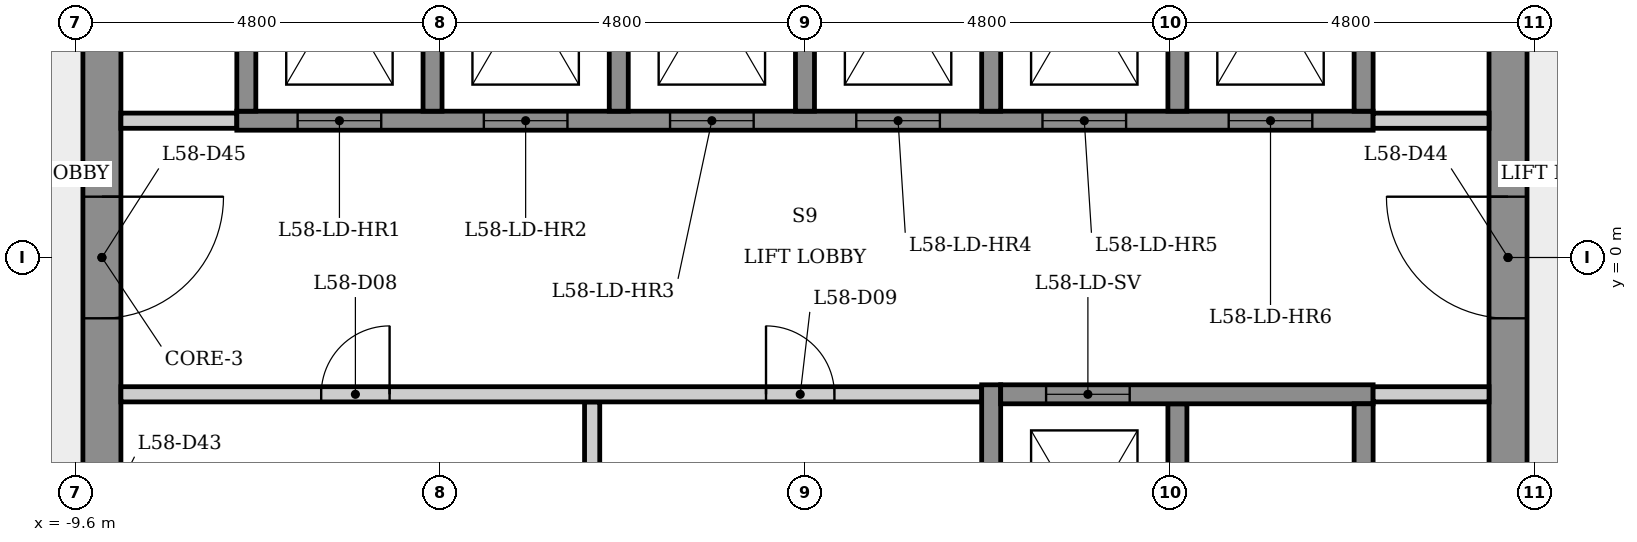
"""IFC4 building model, lengths in metres.
Left out: names, types, materials, properties, quantities, classifications, styles, units other than length and angle.
Written with IfcOpenShell. Run it as: python <this file> out.ifc"""

import sys

from ifc_helpers import new_model, si_unit, direction, frame, frame_2d, origin, place, context, subcontext, project, spatial, rectangle, extrude, element, fill, save


model = new_model("IFC4")
c1 = context("Model", 3, precision=1e-05, world=origin(), true_north=direction((0.0, 1.0)))
c2 = subcontext(c1, "Body", "Model", "MODEL_VIEW")
j1 = project(units=[si_unit("LENGTHUNIT", "METRE"), si_unit("PLANEANGLEUNIT", "RADIAN")], contexts=[c1])
p1 = place(None, origin())
s1 = spatial("IfcSite", under=j1, at=p1, CompositionType="ELEMENT")
p2 = place(p1, origin())
s2 = spatial("IfcBuilding", under=s1, at=p2, CompositionType="ELEMENT")
p3 = place(p2, frame((0.0, 0.0, 218.9)))
s3 = spatial("IfcBuildingStorey", under=s2, at=p3, CompositionType="ELEMENT", Elevation=218.9)
p4 = place(p3, frame((9.25, -5.485, 0.0), z_axis=(0.0, 0.0, 1.0), x_axis=(0.0, 1.0, 0.0)))
e1 = element("IfcWall", 1, at=p4, inside=s3, PredefinedType="SHEAR", context=c2, shape_type="SweptSolid", body=[
    extrude(rectangle(XDim=10.97, YDim=0.5, at=frame_2d((5.485, 0.0))), origin(), (0.0, 0.0, 1.0), 3.4),
])
p5 = place(p4, frame((4.685, 0.0, 0.0)))
e2 = element("IfcOpeningElement", 2, at=p5, cuts=e1, PredefinedType="OPENING", context=c2, shape_type="SweptSolid", body=[
    extrude(rectangle(XDim=1.6, YDim=2.1, at=frame_2d((0.8, 1.05))), frame((0.0, 0.26, 0.0), z_axis=(0.0, -1.0, 0.0), x_axis=(1.0, 0.0, 0.0)), (0.0, 0.0, 1.0), 0.52),
])
p6 = place(p3, frame((-9.25, 5.485, 0.0), z_axis=(0.0, 0.0, 1.0), x_axis=(0.0, -1.0, 0.0)))
e3 = element("IfcWall", 3, at=p6, inside=s3, PredefinedType="SHEAR", context=c2, shape_type="SweptSolid", body=[
    extrude(rectangle(XDim=10.97, YDim=0.5, at=frame_2d((5.485, 0.0))), origin(), (0.0, 0.0, 1.0), 3.4),
])
p7 = place(p6, frame((8.51, 0.0, 0.0)))
e4 = element("IfcOpeningElement", 4, at=p7, cuts=e3, PredefinedType="OPENING", context=c2, shape_type="SweptSolid", body=[
    extrude(rectangle(XDim=0.9, YDim=2.1, at=frame_2d((0.45, 1.05))), frame((0.0, 0.26, 0.0), z_axis=(0.0, -1.0, 0.0), x_axis=(1.0, 0.0, 0.0)), (0.0, 0.0, 1.0), 0.52),
])
p8 = place(p6, frame((4.685, 0.0, 0.0)))
e5 = element("IfcOpeningElement", 5, at=p8, cuts=e3, PredefinedType="OPENING", context=c2, shape_type="SweptSolid", body=[
    extrude(rectangle(XDim=1.6, YDim=2.1, at=frame_2d((0.8, 1.05))), frame((0.0, 0.26, 0.0), z_axis=(0.0, -1.0, 0.0), x_axis=(1.0, 0.0, 0.0)), (0.0, 0.0, 1.0), 0.52),
])
p9 = place(p3, frame((-9.0, 1.8, 0.0), z_axis=(0.0, 0.0, 1.0), x_axis=(1.0, 0.0, 0.0)))
e6 = element("IfcWall", 6, at=p9, inside=s3, PredefinedType="PARTITIONING", context=c2, shape_type="SweptSolid", body=[
    extrude(rectangle(XDim=1.525, YDim=0.2, at=frame_2d((0.763, 0.0))), origin(), (0.0, 0.0, 1.0), 3.05),
])
p10 = place(p3, frame((-7.475, 1.8, 0.0), z_axis=(0.0, 0.0, 1.0), x_axis=(1.0, 0.0, 0.0)))
e7 = element("IfcWall", 7, at=p10, inside=s3, PredefinedType="SHEAR", context=c2, shape_type="SweptSolid", body=[
    extrude(rectangle(XDim=14.95, YDim=0.25, at=frame_2d((7.475, 0.0))), origin(), (0.0, 0.0, 1.0), 3.05),
])
p11 = place(p10, frame((0.8, 0.0, 0.0)))
e8 = element("IfcOpeningElement", 8, at=p11, cuts=e7, PredefinedType="OPENING", context=c2, shape_type="SweptSolid", body=[
    extrude(rectangle(XDim=1.1, YDim=2.1, at=frame_2d((0.55, 1.05))), frame((0.0, 0.135, 0.0), z_axis=(0.0, -1.0, 0.0), x_axis=(1.0, 0.0, 0.0)), (0.0, 0.0, 1.0), 0.27),
])
p12 = place(p10, frame((3.25, 0.0, 0.0)))
e9 = element("IfcOpeningElement", 9, at=p12, cuts=e7, PredefinedType="OPENING", context=c2, shape_type="SweptSolid", body=[
    extrude(rectangle(XDim=1.1, YDim=2.1, at=frame_2d((0.55, 1.05))), frame((0.0, 0.135, 0.0), z_axis=(0.0, -1.0, 0.0), x_axis=(1.0, 0.0, 0.0)), (0.0, 0.0, 1.0), 0.27),
])
p13 = place(p10, frame((5.7, 0.0, 0.0)))
e10 = element("IfcOpeningElement", 10, at=p13, cuts=e7, PredefinedType="OPENING", context=c2, shape_type="SweptSolid", body=[
    extrude(rectangle(XDim=1.1, YDim=2.1, at=frame_2d((0.55, 1.05))), frame((0.0, 0.135, 0.0), z_axis=(0.0, -1.0, 0.0), x_axis=(1.0, 0.0, 0.0)), (0.0, 0.0, 1.0), 0.27),
])
p14 = place(p10, frame((8.15, 0.0, 0.0)))
e11 = element("IfcOpeningElement", 11, at=p14, cuts=e7, PredefinedType="OPENING", context=c2, shape_type="SweptSolid", body=[
    extrude(rectangle(XDim=1.1, YDim=2.1, at=frame_2d((0.55, 1.05))), frame((0.0, 0.135, 0.0), z_axis=(0.0, -1.0, 0.0), x_axis=(1.0, 0.0, 0.0)), (0.0, 0.0, 1.0), 0.27),
])
p15 = place(p10, frame((10.6, 0.0, 0.0)))
e12 = element("IfcOpeningElement", 12, at=p15, cuts=e7, PredefinedType="OPENING", context=c2, shape_type="SweptSolid", body=[
    extrude(rectangle(XDim=1.1, YDim=2.1, at=frame_2d((0.55, 1.05))), frame((0.0, 0.135, 0.0), z_axis=(0.0, -1.0, 0.0), x_axis=(1.0, 0.0, 0.0)), (0.0, 0.0, 1.0), 0.27),
])
p16 = place(p10, frame((13.05, 0.0, 0.0)))
e13 = element("IfcOpeningElement", 13, at=p16, cuts=e7, PredefinedType="OPENING", context=c2, shape_type="SweptSolid", body=[
    extrude(rectangle(XDim=1.1, YDim=2.1, at=frame_2d((0.55, 1.05))), frame((0.0, 0.135, 0.0), z_axis=(0.0, -1.0, 0.0), x_axis=(1.0, 0.0, 0.0)), (0.0, 0.0, 1.0), 0.27),
])
p17 = place(p3, frame((-7.35, 1.925, 0.0), z_axis=(0.0, 0.0, 1.0), x_axis=(0.0, 1.0, 0.0)))
e14 = element("IfcWall", 14, at=p17, inside=s3, PredefinedType="SHEAR", context=c2, shape_type="SweptSolid", body=[
    extrude(rectangle(XDim=3.35, YDim=0.25, at=frame_2d((1.675, 0.0))), origin(), (0.0, 0.0, 1.0), 3.05),
])
p18 = place(p3, frame((-4.9, 5.025, 0.0), z_axis=(0.0, 0.0, 1.0), x_axis=(0.0, -1.0, 0.0)))
e15 = element("IfcWall", 15, at=p18, inside=s3, PredefinedType="SHEAR", context=c2, shape_type="SweptSolid", body=[
    extrude(rectangle(XDim=3.1, YDim=0.25, at=frame_2d((1.55, 0.0))), origin(), (0.0, 0.0, 1.0), 3.4),
])
p19 = place(p3, frame((-2.8, -1.9, 0.0), z_axis=(0.0, 0.0, 1.0), x_axis=(0.0, -1.0, 0.0)))
e16 = element("IfcWall", 16, at=p19, inside=s3, PredefinedType="PARTITIONING", context=c2, shape_type="SweptSolid", body=[
    extrude(rectangle(XDim=3.15, YDim=0.2, at=frame_2d((1.575, 0.0))), origin(), (0.0, 0.0, 1.0), 3.05),
])
p20 = place(p3, frame((-9.0, -1.8, 0.0), z_axis=(0.0, 0.0, 1.0), x_axis=(1.0, 0.0, 0.0)))
e17 = element("IfcWall", 17, at=p20, inside=s3, PredefinedType="PARTITIONING", context=c2, shape_type="SweptSolid", body=[
    extrude(rectangle(XDim=11.325, YDim=0.2, at=frame_2d((5.663, 0.0))), origin(), (0.0, 0.0, 1.0), 3.05),
])
p21 = place(p20, frame((2.635, 0.0, 0.0)))
e18 = element("IfcOpeningElement", 18, at=p21, cuts=e17, PredefinedType="OPENING", context=c2, shape_type="SweptSolid", body=[
    extrude(rectangle(XDim=0.9, YDim=2.1, at=frame_2d((0.45, 1.05))), frame((0.0, 0.11, 0.0), z_axis=(0.0, -1.0, 0.0), x_axis=(1.0, 0.0, 0.0)), (0.0, 0.0, 1.0), 0.22),
])
p22 = place(p20, frame((8.488, 0.0, 0.0)))
e19 = element("IfcOpeningElement", 19, at=p22, cuts=e17, PredefinedType="OPENING", context=c2, shape_type="SweptSolid", body=[
    extrude(rectangle(XDim=0.9, YDim=2.1, at=frame_2d((0.45, 1.05))), frame((0.0, 0.11, 0.0), z_axis=(0.0, -1.0, 0.0), x_axis=(1.0, 0.0, 0.0)), (0.0, 0.0, 1.0), 0.22),
])
for number, where, z_axis, x_axis in (
    (20, (-2.45, 5.025, 0.0), (0.0, 0.0, 1.0), (0.0, -1.0, 0.0)),
    (21, (0.0, 5.025, 0.0), (0.0, 0.0, 1.0), (0.0, -1.0, 0.0)),
):
    element("IfcWall", number, at=place(p3, frame(where, z_axis=z_axis, x_axis=x_axis)), inside=s3, PredefinedType="SHEAR", context=c2, shape_type="SweptSolid", body=[
        extrude(rectangle(XDim=3.1, YDim=0.25, at=frame_2d((1.55, 0.0))), origin(), (0.0, 0.0, 1.0), 3.4),
    ])
p23 = place(p3, frame((2.45, -5.275, 0.0), z_axis=(0.0, 0.0, 1.0), x_axis=(0.0, 1.0, 0.0)))
e22 = element("IfcWall", 22, at=p23, inside=s3, PredefinedType="SHEAR", context=c2, shape_type="SweptSolid", body=[
    extrude(rectangle(XDim=3.6, YDim=0.25, at=frame_2d((1.8, 0.0))), origin(), (0.0, 0.0, 1.0), 3.05),
])
for number, where, z_axis, x_axis in (
    (23, (2.45, 5.025, 0.0), (0.0, 0.0, 1.0), (0.0, -1.0, 0.0)),
    (24, (4.9, -1.925, 0.0), (0.0, 0.0, 1.0), (0.0, -1.0, 0.0)),
    (25, (4.9, 5.025, 0.0), (0.0, 0.0, 1.0), (0.0, -1.0, 0.0)),
):
    element("IfcWall", number, at=place(p3, frame(where, z_axis=z_axis, x_axis=x_axis)), inside=s3, PredefinedType="SHEAR", context=c2, shape_type="SweptSolid", body=[
        extrude(rectangle(XDim=3.1, YDim=0.25, at=frame_2d((1.55, 0.0))), origin(), (0.0, 0.0, 1.0), 3.4),
    ])
p24 = place(p3, frame((2.575, -1.8, 0.0), z_axis=(0.0, 0.0, 1.0), x_axis=(1.0, 0.0, 0.0)))
e26 = element("IfcWall", 26, at=p24, inside=s3, PredefinedType="SHEAR", context=c2, shape_type="SweptSolid", body=[
    extrude(rectangle(XDim=4.9, YDim=0.25, at=frame_2d((2.45, 0.0))), origin(), (0.0, 0.0, 1.0), 3.05),
])
p25 = place(p24, frame((0.597, 0.0, 0.0)))
e27 = element("IfcOpeningElement", 27, at=p25, cuts=e26, PredefinedType="OPENING", context=c2, shape_type="SweptSolid", body=[
    extrude(rectangle(XDim=1.1, YDim=2.1, at=frame_2d((0.55, 1.05))), frame((0.0, 0.135, 0.0), z_axis=(0.0, -1.0, 0.0), x_axis=(1.0, 0.0, 0.0)), (0.0, 0.0, 1.0), 0.27),
])
p26 = place(p3, frame((7.475, 1.8, 0.0), z_axis=(0.0, 0.0, 1.0), x_axis=(1.0, 0.0, 0.0)))
e28 = element("IfcWall", 28, at=p26, inside=s3, PredefinedType="PARTITIONING", context=c2, shape_type="SweptSolid", body=[
    extrude(rectangle(XDim=1.525, YDim=0.2, at=frame_2d((0.763, 0.0))), origin(), (0.0, 0.0, 1.0), 3.05),
])
for number, where, z_axis, x_axis in (
    (29, (7.35, -1.925, 0.0), (0.0, 0.0, 1.0), (0.0, -1.0, 0.0)),
    (30, (7.35, 5.025, 0.0), (0.0, 0.0, 1.0), (0.0, -1.0, 0.0)),
):
    element("IfcWall", number, at=place(p3, frame(where, z_axis=z_axis, x_axis=x_axis)), inside=s3, PredefinedType="SHEAR", context=c2, shape_type="SweptSolid", body=[
        extrude(rectangle(XDim=3.1, YDim=0.25, at=frame_2d((1.55, 0.0))), origin(), (0.0, 0.0, 1.0), 3.4),
    ])
p27 = place(p3, frame((9.0, -1.8, 0.0), z_axis=(0.0, 0.0, 1.0), x_axis=(-1.0, 0.0, 0.0)))
e31 = element("IfcWall", 31, at=p27, inside=s3, PredefinedType="PARTITIONING", context=c2, shape_type="SweptSolid", body=[
    extrude(rectangle(XDim=1.525, YDim=0.2, at=frame_2d((0.763, 0.0))), origin(), (0.0, 0.0, 1.0), 3.05),
])
p28 = place(p11, origin())
e32 = element("IfcDoor", 32, at=p28, inside=s3, OperationType="SLIDING_TO_LEFT", PredefinedType="DOOR", context=c2, shape_type="SweptSolid", body=[
    extrude(rectangle(XDim=1.1, YDim=2.1, at=frame_2d((0.55, 1.05))), frame((0.0, 0.025, 0.0), z_axis=(0.0, -1.0, 0.0), x_axis=(1.0, 0.0, 0.0)), (0.0, 0.0, 1.0), 0.05),
])
fill(e8, e32)
p29 = place(p12, origin())
e33 = element("IfcDoor", 33, at=p29, inside=s3, OperationType="SLIDING_TO_LEFT", PredefinedType="DOOR", context=c2, shape_type="SweptSolid", body=[
    extrude(rectangle(XDim=1.1, YDim=2.1, at=frame_2d((0.55, 1.05))), frame((0.0, 0.025, 0.0), z_axis=(0.0, -1.0, 0.0), x_axis=(1.0, 0.0, 0.0)), (0.0, 0.0, 1.0), 0.05),
])
fill(e9, e33)
p30 = place(p13, origin())
e34 = element("IfcDoor", 34, at=p30, inside=s3, OperationType="SLIDING_TO_LEFT", PredefinedType="DOOR", context=c2, shape_type="SweptSolid", body=[
    extrude(rectangle(XDim=1.1, YDim=2.1, at=frame_2d((0.55, 1.05))), frame((0.0, 0.025, 0.0), z_axis=(0.0, -1.0, 0.0), x_axis=(1.0, 0.0, 0.0)), (0.0, 0.0, 1.0), 0.05),
])
fill(e10, e34)
p31 = place(p14, origin())
e35 = element("IfcDoor", 35, at=p31, inside=s3, OperationType="SLIDING_TO_LEFT", PredefinedType="DOOR", context=c2, shape_type="SweptSolid", body=[
    extrude(rectangle(XDim=1.1, YDim=2.1, at=frame_2d((0.55, 1.05))), frame((0.0, 0.025, 0.0), z_axis=(0.0, -1.0, 0.0), x_axis=(1.0, 0.0, 0.0)), (0.0, 0.0, 1.0), 0.05),
])
fill(e11, e35)
p32 = place(p15, origin())
e36 = element("IfcDoor", 36, at=p32, inside=s3, OperationType="SLIDING_TO_LEFT", PredefinedType="DOOR", context=c2, shape_type="SweptSolid", body=[
    extrude(rectangle(XDim=1.1, YDim=2.1, at=frame_2d((0.55, 1.05))), frame((0.0, 0.025, 0.0), z_axis=(0.0, -1.0, 0.0), x_axis=(1.0, 0.0, 0.0)), (0.0, 0.0, 1.0), 0.05),
])
fill(e12, e36)
p33 = place(p16, origin())
e37 = element("IfcDoor", 37, at=p33, inside=s3, OperationType="SLIDING_TO_LEFT", PredefinedType="DOOR", context=c2, shape_type="SweptSolid", body=[
    extrude(rectangle(XDim=1.1, YDim=2.1, at=frame_2d((0.55, 1.05))), frame((0.0, 0.025, 0.0), z_axis=(0.0, -1.0, 0.0), x_axis=(1.0, 0.0, 0.0)), (0.0, 0.0, 1.0), 0.05),
])
fill(e13, e37)
p34 = place(p25, origin())
e38 = element("IfcDoor", 38, at=p34, inside=s3, OperationType="SLIDING_TO_LEFT", PredefinedType="DOOR", context=c2, shape_type="SweptSolid", body=[
    extrude(rectangle(XDim=1.1, YDim=2.1, at=frame_2d((0.55, 1.05))), frame((0.0, 0.025, 0.0), z_axis=(0.0, -1.0, 0.0), x_axis=(1.0, 0.0, 0.0)), (0.0, 0.0, 1.0), 0.05),
])
fill(e27, e38)
p35 = place(p21, origin())
e39 = element("IfcDoor", 39, at=p35, inside=s3, OperationType="SINGLE_SWING_RIGHT", PredefinedType="DOOR", context=c2, shape_type="SweptSolid", body=[
    extrude(rectangle(XDim=0.9, YDim=2.1, at=frame_2d((0.45, 1.05))), frame((0.0, 0.025, 0.0), z_axis=(0.0, -1.0, 0.0), x_axis=(1.0, 0.0, 0.0)), (0.0, 0.0, 1.0), 0.05),
])
fill(e18, e39)
p36 = place(p22, origin())
e40 = element("IfcDoor", 40, at=p36, inside=s3, OperationType="SINGLE_SWING_LEFT", PredefinedType="DOOR", context=c2, shape_type="SweptSolid", body=[
    extrude(rectangle(XDim=0.9, YDim=2.1, at=frame_2d((0.45, 1.05))), frame((0.0, 0.025, 0.0), z_axis=(0.0, -1.0, 0.0), x_axis=(1.0, 0.0, 0.0)), (0.0, 0.0, 1.0), 0.05),
])
fill(e19, e40)
p37 = place(p5, origin())
e41 = element("IfcDoor", 41, at=p37, inside=s3, OperationType="SINGLE_SWING_RIGHT", PredefinedType="DOOR", context=c2, shape_type="SweptSolid", body=[
    extrude(rectangle(XDim=1.6, YDim=2.1, at=frame_2d((0.8, 1.05))), frame((0.0, 0.025, 0.0), z_axis=(0.0, -1.0, 0.0), x_axis=(1.0, 0.0, 0.0)), (0.0, 0.0, 1.0), 0.05),
])
fill(e2, e41)
p38 = place(p8, origin())
e42 = element("IfcDoor", 42, at=p38, inside=s3, OperationType="SINGLE_SWING_LEFT", PredefinedType="DOOR", context=c2, shape_type="SweptSolid", body=[
    extrude(rectangle(XDim=1.6, YDim=2.1, at=frame_2d((0.8, 1.05))), frame((0.0, 0.025, 0.0), z_axis=(0.0, -1.0, 0.0), x_axis=(1.0, 0.0, 0.0)), (0.0, 0.0, 1.0), 0.05),
])
fill(e5, e42)
save(model, sys.argv[1])
